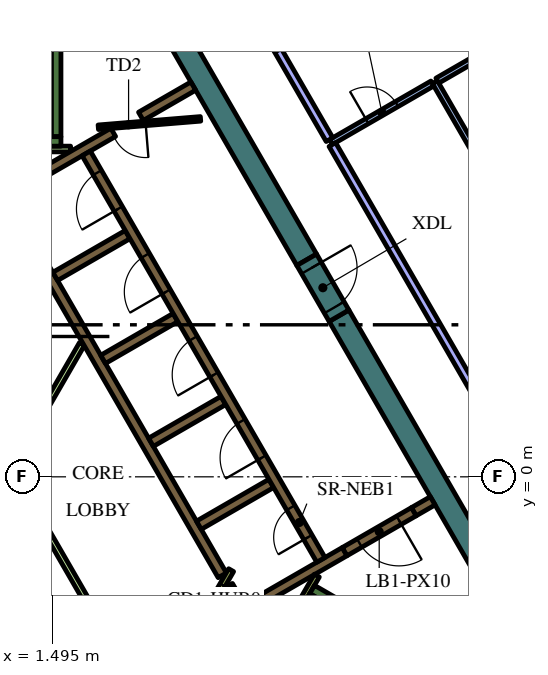
"""IFC4 building model, lengths in metres.
Left out: names, types, materials, properties, quantities, classifications, styles, units other than length and angle.
Written with IfcOpenShell. Run it as: python <this file> out.ifc"""

import sys

from ifc_helpers import new_model, si_unit, direction, frame, frame_2d, origin, place, context, subcontext, project, spatial, rectangle, extrude, element, fill, save


model = new_model("IFC4")
c1 = context("Model", 3, precision=1e-05, world=origin(), true_north=direction((0.0, 1.0)))
c2 = subcontext(c1, "Body", "Model", "MODEL_VIEW")
j1 = project(units=[si_unit("LENGTHUNIT", "METRE"), si_unit("PLANEANGLEUNIT", "RADIAN")], contexts=[c1])
p1 = place(None, origin())
s1 = spatial("IfcSite", under=j1, at=p1, CompositionType="ELEMENT")
p2 = place(p1, origin())
s2 = spatial("IfcBuilding", under=s1, at=p2, CompositionType="ELEMENT")
p3 = place(p2, frame((0.0, 0.0, 279.6)))
s3 = spatial("IfcBuildingStorey", under=s2, at=p3, CompositionType="ELEMENT", Elevation=279.6)
for number, where, z_axis, x_axis in (
    (1, (9.042, 4.239, 0.0), (0.0, 0.0, 1.0), (0.5, -0.866, 0.0)),
    (2, (1.989, 16.456, 0.0), (0.0, 0.0, 1.0), (0.5, -0.866, 0.0)),
):
    element("IfcWall", number, at=place(p3, frame(where, z_axis=z_axis, x_axis=x_axis)), inside=s3, PredefinedType="SOLIDWALL", context=c2, shape_type="SweptSolid", body=[
        extrude(rectangle(XDim=12.406, YDim=0.6, at=frame_2d((6.203, 0.0))), origin(), (0.0, 0.0, 1.0), 4.2),
    ])
p4 = place(p3, frame((8.334, -2.964, 0.0), z_axis=(0.0, 0.0, 1.0), x_axis=(0.866016039709, -0.500016218704, 0.0)))
e3 = element("IfcWall", 3, at=p4, inside=s3, PredefinedType="SOLIDWALL", context=c2, shape_type="SweptSolid", body=[
    extrude(rectangle(XDim=7.05, YDim=0.25, at=frame_2d((3.525, 0.0))), origin(), (0.0, 0.0, 1.0), 4.2),
])
p5 = place(p3, frame((8.168, -3.503, 0.0), z_axis=(0.0, 0.0, 1.0), x_axis=(0.49972245349, 0.866185586049, 0.0)))
e4 = element("IfcWall", 4, at=p5, inside=s3, PredefinedType="SOLIDWALL", context=c2, shape_type="SweptSolid", body=[
    extrude(rectangle(XDim=0.425, YDim=0.25, at=frame_2d((0.212, 0.0))), origin(), (0.0, 0.0, 1.0), 4.2),
])
p6 = place(p3, frame((1.6, 8.95, 0.0), z_axis=(0.0, 0.0, 1.0), x_axis=(0.0, 1.0, 0.0)))
e5 = element("IfcWall", 5, at=p6, inside=s3, PredefinedType="SOLIDWALL", context=c2, shape_type="SweptSolid", body=[
    extrude(rectangle(XDim=6.8, YDim=0.25, at=frame_2d((3.4, 0.0))), origin(), (0.0, 0.0, 1.0), 4.2),
])
p7 = place(p3, frame((1.05, 8.825, 0.0), z_axis=(0.0, 0.0, 1.0), x_axis=(1.0, 0.0, 0.0)))
e6 = element("IfcWall", 6, at=p7, inside=s3, PredefinedType="SOLIDWALL", context=c2, shape_type="SweptSolid", body=[
    extrude(rectangle(XDim=0.675, YDim=0.25, at=frame_2d((0.337, 0.0))), origin(), (0.0, 0.0, 1.0), 4.2),
])
p8 = place(p3, frame((9.19, -1.969, 0.0), z_axis=(0.0, 0.0, 1.0), x_axis=(-0.866057109641, -0.499945079824, 0.0)))
e7 = element("IfcWall", 7, at=p8, inside=s3, PredefinedType="SOLIDWALL", context=c2, shape_type="SweptSolid", body=[
    extrude(rectangle(XDim=3.291, YDim=0.25, at=frame_2d((1.646, 0.0))), origin(), (0.0, 0.0, 1.0), 4.2),
])
p9 = place(p3, frame((6.13, -2.867, 0.0), z_axis=(0.0, 0.0, 1.0), x_axis=(0.500160776593, -0.865932559475, 0.0)))
e8 = element("IfcWall", 8, at=p9, inside=s3, PredefinedType="SOLIDWALL", context=c2, shape_type="SweptSolid", body=[
    extrude(rectangle(XDim=0.627, YDim=0.25, at=frame_2d((0.313, 0.0))), origin(), (0.0, 0.0, 1.0), 4.2),
])
p10 = place(p3, frame((11.507, -0.631, 0.0), z_axis=(0.0, 0.0, 1.0), x_axis=(-0.866093731455, -0.499881634324, 0.0)))
e9 = element("IfcWall", 9, at=p10, inside=s3, PredefinedType="SOLIDWALL", context=c2, shape_type="SweptSolid", body=[
    extrude(rectangle(XDim=0.575, YDim=0.25, at=frame_2d((0.288, 0.0))), origin(), (0.0, 0.0, 1.0), 4.2),
])
p11 = place(p3, frame((3.1, 9.064, 0.0), z_axis=(0.0, 0.0, 1.0), x_axis=(-0.866033137035, -0.499986605379, 0.0)))
e10 = element("IfcWall", 10, at=p11, inside=s3, PredefinedType="SOLIDWALL", context=c2, shape_type="SweptSolid", body=[
    extrude(rectangle(XDim=3.467, YDim=0.25, at=frame_2d((1.733, 0.0))), origin(), (0.0, 0.0, 1.0), 4.2),
])
p12 = place(p3, frame((5.97, -2.591, 0.0), z_axis=(0.0, 0.0, 1.0), x_axis=(-0.499994469932, 0.866028596547, 0.0)))
e11 = element("IfcWall", 11, at=p12, inside=s3, PredefinedType="SOLIDWALL", context=c2, shape_type="SweptSolid", body=[
    extrude(rectangle(XDim=10.488, YDim=0.25, at=frame_2d((5.244, 0.0))), origin(), (0.0, 0.0, 1.0), 4.2),
])
p13 = place(p3, frame((1.574, 5.274, 0.0), z_axis=(0.0, 0.0, 1.0), x_axis=(0.866028486751, 0.499994660107, 0.0)))
e12 = element("IfcWall", 12, at=p13, inside=s3, PredefinedType="SOLIDWALL", context=c2, shape_type="SweptSolid", body=[
    extrude(rectangle(XDim=2.2, YDim=0.25, at=frame_2d((1.1, 0.0))), origin(), (0.0, 0.0, 1.0), 4.2),
])
for number, where, z_axis, x_axis in (
    (13, (2.834, 3.091, 0.0), (0.0, 0.0, 1.0), (0.866, 0.5, 0.0)),
    (14, (4.094, 0.909, 0.0), (0.0, 0.0, 1.0), (0.866, 0.5, 0.0)),
    (15, (5.354, -1.274, 0.0), (0.0, 0.0, 1.0), (0.866, 0.5, 0.0)),
):
    element("IfcWall", number, at=place(p3, frame(where, z_axis=z_axis, x_axis=x_axis)), inside=s3, PredefinedType="SOLIDWALL", context=c2, shape_type="SweptSolid", body=[
        extrude(rectangle(XDim=2.2, YDim=0.25, at=frame_2d((1.1, 0.0))), origin(), (0.0, 0.0, 1.0), 4.2),
    ])
p14 = place(p3, frame((3.83, 9.486, 0.0), z_axis=(0.0, 0.0, 1.0), x_axis=(0.865986202621, 0.500067892261, 0.0)))
e16 = element("IfcWall", 16, at=p14, inside=s3, PredefinedType="SOLIDWALL", context=c2, shape_type="SweptSolid", body=[
    extrude(rectangle(XDim=1.591, YDim=0.25, at=frame_2d((0.795, 0.0))), origin(), (0.0, 0.0, 1.0), 4.2),
])
p15 = place(p3, frame((1.05, 8.625, 0.0), z_axis=(0.0, 0.0, 1.0), x_axis=(1.0, 0.0, 0.0)))
e17 = element("IfcWall", 17, at=p15, inside=s3, PredefinedType="PARTITIONING", context=c2, shape_type="SweptSolid", body=[
    extrude(rectangle(XDim=0.929, YDim=0.15, at=frame_2d((0.464, 0.0))), origin(), (0.0, 0.0, 1.0), 3.55),
])
p16 = place(p3, frame((8.459, -2.599, 0.0), z_axis=(0.0, 0.0, 1.0), x_axis=(-0.500041054325, -0.866001699761, 0.0)))
e18 = element("IfcWall", 18, at=p16, inside=s3, PredefinedType="PARTITIONING", context=c2, shape_type="SweptSolid", body=[
    extrude(rectangle(XDim=0.929, YDim=0.15, at=frame_2d((0.464, 0.0))), origin(), (0.0, 0.0, 1.0), 4.2),
])
p17 = place(p3, frame((-1.887, 4.168, 0.0), z_axis=(0.0, 0.0, 1.0), x_axis=(0.499997069472, -0.866027095719, 0.0)))
e19 = element("IfcWall", 19, at=p17, inside=s3, PredefinedType="PARTITIONING", context=c2, shape_type="SweptSolid", body=[
    extrude(rectangle(XDim=9.106, YDim=0.15, at=frame_2d((4.553, 0.0))), origin(), (0.0, 0.0, 1.0), 3.55),
])
p18 = place(p3, frame((2.277, 3.493, 0.0), z_axis=(0.0, 0.0, 1.0), x_axis=(-0.499994550825, -0.866028549844, 0.0)))
e20 = element("IfcWall", 20, at=p18, inside=s3, PredefinedType="PARTITIONING", context=c2, shape_type="SweptSolid", body=[
    extrude(rectangle(XDim=3.65, YDim=0.15, at=frame_2d((1.825, 0.0))), origin(), (0.0, 0.0, 1.0), 3.55),
])
p19 = place(p3, frame((8.565, -2.185, 0.0), z_axis=(0.0, 0.0, 1.0), x_axis=(-0.499997954832, 0.866026584559, 0.0)))
e21 = element("IfcWall", 21, at=p19, inside=s3, PredefinedType="SOLIDWALL", context=c2, shape_type="SweptSolid", body=[
    extrude(rectangle(XDim=12.35, YDim=0.25, at=frame_2d((6.175, 0.0))), origin(), (0.0, 0.0, 1.0), 4.2),
])
p20 = place(p19, frame((0.685, 0.0, 0.0)))
e22 = element("IfcOpeningElement", 22, at=p20, cuts=e21, PredefinedType="OPENING", context=c2, shape_type="SweptSolid", body=[
    extrude(rectangle(XDim=0.9, YDim=2.1, at=frame_2d((0.45, 1.05))), frame((0.0, 0.135, 0.0), z_axis=(0.0, -1.0, 0.0), x_axis=(1.0, 0.0, 0.0)), (0.0, 0.0, 1.0), 0.27),
])
p21 = place(p19, frame((3.105, 0.0, 0.0)))
e23 = element("IfcOpeningElement", 23, at=p21, cuts=e21, PredefinedType="OPENING", context=c2, shape_type="SweptSolid", body=[
    extrude(rectangle(XDim=1.1, YDim=2.1, at=frame_2d((0.55, 1.05))), frame((0.0, 0.135, 0.0), z_axis=(0.0, -1.0, 0.0), x_axis=(1.0, 0.0, 0.0)), (0.0, 0.0, 1.0), 0.27),
])
p22 = place(p19, frame((5.625, 0.0, 0.0)))
e24 = element("IfcOpeningElement", 24, at=p22, cuts=e21, PredefinedType="OPENING", context=c2, shape_type="SweptSolid", body=[
    extrude(rectangle(XDim=1.1, YDim=2.1, at=frame_2d((0.55, 1.05))), frame((0.0, 0.135, 0.0), z_axis=(0.0, -1.0, 0.0), x_axis=(1.0, 0.0, 0.0)), (0.0, 0.0, 1.0), 0.27),
])
p23 = place(p19, frame((8.145, 0.0, 0.0)))
e25 = element("IfcOpeningElement", 25, at=p23, cuts=e21, PredefinedType="OPENING", context=c2, shape_type="SweptSolid", body=[
    extrude(rectangle(XDim=1.1, YDim=2.1, at=frame_2d((0.55, 1.05))), frame((0.0, 0.135, 0.0), z_axis=(0.0, -1.0, 0.0), x_axis=(1.0, 0.0, 0.0)), (0.0, 0.0, 1.0), 0.27),
])
p24 = place(p19, frame((10.665, 0.0, 0.0)))
e26 = element("IfcOpeningElement", 26, at=p24, cuts=e21, PredefinedType="OPENING", context=c2, shape_type="SweptSolid", body=[
    extrude(rectangle(XDim=1.1, YDim=2.1, at=frame_2d((0.55, 1.05))), frame((0.0, 0.135, 0.0), z_axis=(0.0, -1.0, 0.0), x_axis=(1.0, 0.0, 0.0)), (0.0, 0.0, 1.0), 0.27),
])
p25 = place(p3, frame((5.398, 9.419, 0.0), z_axis=(0.0, 0.0, 1.0), x_axis=(-0.996653416376, -0.081743303248, 0.0)))
e27 = element("IfcWall", 27, at=p25, inside=s3, PredefinedType="PARTITIONING", context=c2, shape_type="SweptSolid", body=[
    extrude(rectangle(XDim=2.7, YDim=0.12, at=frame_2d((1.35, 0.0))), origin(), (0.0, 0.0, 1.0), 3.55),
])
p26 = place(p25, frame((1.45, 0.0, 0.0)))
e28 = element("IfcOpeningElement", 28, at=p26, cuts=e27, PredefinedType="OPENING", context=c2, shape_type="SweptSolid", body=[
    extrude(rectangle(XDim=0.9, YDim=2.1, at=frame_2d((0.45, 1.05))), frame((0.0, 0.07, 0.0), z_axis=(0.0, -1.0, 0.0), x_axis=(1.0, 0.0, 0.0)), (0.0, 0.0, 1.0), 0.14),
])
p27 = place(p3, frame((6.203, -2.456, 0.0), z_axis=(0.0, 0.0, 1.0), x_axis=(-0.500043961785, -0.866000020948, 0.0)))
e29 = element("IfcWall", 29, at=p27, inside=s3, PredefinedType="PARTITIONING", context=c2, shape_type="SweptSolid", body=[
    extrude(rectangle(XDim=1.95, YDim=0.15, at=frame_2d((0.975, 0.0))), origin(), (0.0, 0.0, 1.0), 4.2),
])
p28 = place(p27, frame((0.45, 0.0, 0.0)))
e30 = element("IfcOpeningElement", 30, at=p28, cuts=e29, PredefinedType="OPENING", context=c2, shape_type="SweptSolid", body=[
    extrude(rectangle(XDim=0.9, YDim=2.1, at=frame_2d((0.45, 1.05))), frame((0.0, 0.085, 0.0), z_axis=(0.0, -1.0, 0.0), x_axis=(1.0, 0.0, 0.0)), (0.0, 0.0, 1.0), 0.17),
])
p29 = place(p3, frame((11.009, -0.919, 0.0), z_axis=(0.0, 0.0, 1.0), x_axis=(-0.866059744384, -0.49994051562, 0.0)))
e31 = element("IfcWall", 31, at=p29, inside=s3, PredefinedType="SOLIDWALL", context=c2, shape_type="SweptSolid", body=[
    extrude(rectangle(XDim=2.1, YDim=0.25, at=frame_2d((1.05, 0.0))), origin(), (0.0, 0.0, 1.0), 4.2),
])
p30 = place(p29, frame((0.45, 0.0, 0.0)))
e32 = element("IfcOpeningElement", 32, at=p30, cuts=e31, PredefinedType="OPENING", context=c2, shape_type="SweptSolid", body=[
    extrude(rectangle(XDim=1.2, YDim=2.1, at=frame_2d((0.6, 1.05))), frame((0.0, 0.135, 0.0), z_axis=(0.0, -1.0, 0.0), x_axis=(1.0, 0.0, 0.0)), (0.0, 0.0, 1.0), 0.27),
])
p31 = place(p3, frame((8.192, 5.711, 0.0), z_axis=(0.0, 0.0, 1.0), x_axis=(0.500062241894, -0.865989465428, 0.0)))
e33 = element("IfcWall", 33, at=p31, inside=s3, PredefinedType="SOLIDWALL", context=c2, shape_type="SweptSolid", body=[
    extrude(rectangle(XDim=1.7, YDim=0.6, at=frame_2d((0.85, 0.0))), origin(), (0.0, 0.0, 1.0), 4.2),
])
p32 = place(p31, frame((0.25, 0.0, 0.0)))
e34 = element("IfcOpeningElement", 34, at=p32, cuts=e33, PredefinedType="OPENING", context=c2, shape_type="SweptSolid", body=[
    extrude(rectangle(XDim=1.2, YDim=2.1, at=frame_2d((0.6, 1.05))), frame((0.0, 0.31, 0.0), z_axis=(0.0, -1.0, 0.0), x_axis=(1.0, 0.0, 0.0)), (0.0, 0.0, 1.0), 0.62),
])
p33 = place(p3, frame((11.564, 10.387, 0.0), z_axis=(0.0, 0.0, 1.0), x_axis=(0.500002559113, -0.866023926275, 0.0)))
e35 = element("IfcWall", 35, at=p33, inside=s3, PredefinedType="PARTITIONING", context=c2, shape_type="SweptSolid", body=[
    extrude(rectangle(XDim=6.212, YDim=0.15, at=frame_2d((3.106, 0.0))), origin(), (0.0, 0.0, 1.0), 3.55),
])
p34 = place(p33, frame((2.612, 0.0, 0.0)))
e36 = element("IfcOpeningElement", 36, at=p34, cuts=e35, PredefinedType="OPENING", context=c2, shape_type="SweptSolid", body=[
    extrude(rectangle(XDim=0.9, YDim=2.1, at=frame_2d((0.45, 1.05))), frame((0.0, 0.085, 0.0), z_axis=(0.0, -1.0, 0.0), x_axis=(1.0, 0.0, 0.0)), (0.0, 0.0, 1.0), 0.17),
])
p35 = place(p3, frame((11.629, 10.424, 0.0), z_axis=(0.0, 0.0, 1.0), x_axis=(0.866061796884, 0.499936960004, 0.0)))
e37 = element("IfcWall", 37, at=p35, inside=s3, PredefinedType="PARTITIONING", context=c2, shape_type="SweptSolid", body=[
    extrude(rectangle(XDim=3.021, YDim=0.15, at=frame_2d((1.511, 0.0))), origin(), (0.0, 0.0, 1.0), 3.55),
])
p36 = place(p3, frame((8.829, 8.808, 0.0), z_axis=(0.0, 0.0, 1.0), x_axis=(0.866041857893, 0.499971499565, 0.0)))
e38 = element("IfcWall", 38, at=p36, inside=s3, PredefinedType="PARTITIONING", context=c2, shape_type="SweptSolid", body=[
    extrude(rectangle(XDim=3.083, YDim=0.15, at=frame_2d((1.542, 0.0))), origin(), (0.0, 0.0, 1.0), 3.55),
])
p37 = place(p36, frame((1.1, 0.0, 0.0)))
e39 = element("IfcOpeningElement", 39, at=p37, cuts=e38, PredefinedType="OPENING", context=c2, shape_type="SweptSolid", body=[
    extrude(rectangle(XDim=0.9, YDim=2.1, at=frame_2d((0.45, 1.05))), frame((0.0, 0.085, 0.0), z_axis=(0.0, -1.0, 0.0), x_axis=(1.0, 0.0, 0.0)), (0.0, 0.0, 1.0), 0.17),
])
p38 = place(p3, frame((13.436, 0.829, 0.0), z_axis=(0.0, 0.0, 1.0), x_axis=(-0.499983789798, 0.866034762547, 0.0)))
e40 = element("IfcWall", 40, at=p38, inside=s3, PredefinedType="PARTITIONING", context=c2, shape_type="SweptSolid", body=[
    extrude(rectangle(XDim=9.138, YDim=0.2, at=frame_2d((4.569, 0.0))), origin(), (0.0, 0.0, 1.0), 3.55),
])
p39 = place(p3, frame((8.792, 8.873, 0.0), z_axis=(0.0, 0.0, 1.0), x_axis=(-0.499992600721, 0.866029675718, 0.0)))
e41 = element("IfcWall", 41, at=p39, inside=s3, PredefinedType="PARTITIONING", context=c2, shape_type="SweptSolid", body=[
    extrude(rectangle(XDim=2.712, YDim=0.2, at=frame_2d((1.356, 0.0))), origin(), (0.0, 0.0, 1.0), 3.55),
])
p40 = place(p20, origin())
e42 = element("IfcDoor", 42, at=p40, inside=s3, OperationType="SINGLE_SWING_LEFT", PredefinedType="DOOR", context=c2, shape_type="SweptSolid", body=[
    extrude(rectangle(XDim=0.9, YDim=2.1, at=frame_2d((0.45, 1.05))), frame((0.0, 0.025, 0.0), z_axis=(0.0, -1.0, 0.0), x_axis=(1.0, 0.0, 0.0)), (0.0, 0.0, 1.0), 0.05),
])
fill(e22, e42)
p41 = place(p21, origin())
e43 = element("IfcDoor", 43, at=p41, inside=s3, OperationType="DOUBLE_DOOR_SLIDING", PredefinedType="DOOR", context=c2, shape_type="SweptSolid", body=[
    extrude(rectangle(XDim=1.1, YDim=2.1, at=frame_2d((0.55, 1.05))), frame((0.0, 0.025, 0.0), z_axis=(0.0, -1.0, 0.0), x_axis=(1.0, 0.0, 0.0)), (0.0, 0.0, 1.0), 0.05),
])
fill(e23, e43)
p42 = place(p22, origin())
e44 = element("IfcDoor", 44, at=p42, inside=s3, OperationType="DOUBLE_DOOR_SLIDING", PredefinedType="DOOR", context=c2, shape_type="SweptSolid", body=[
    extrude(rectangle(XDim=1.1, YDim=2.1, at=frame_2d((0.55, 1.05))), frame((0.0, 0.025, 0.0), z_axis=(0.0, -1.0, 0.0), x_axis=(1.0, 0.0, 0.0)), (0.0, 0.0, 1.0), 0.05),
])
fill(e24, e44)
p43 = place(p23, origin())
e45 = element("IfcDoor", 45, at=p43, inside=s3, OperationType="DOUBLE_DOOR_SLIDING", PredefinedType="DOOR", context=c2, shape_type="SweptSolid", body=[
    extrude(rectangle(XDim=1.1, YDim=2.1, at=frame_2d((0.55, 1.05))), frame((0.0, 0.025, 0.0), z_axis=(0.0, -1.0, 0.0), x_axis=(1.0, 0.0, 0.0)), (0.0, 0.0, 1.0), 0.05),
])
fill(e25, e45)
p44 = place(p24, origin())
e46 = element("IfcDoor", 46, at=p44, inside=s3, OperationType="DOUBLE_DOOR_SLIDING", PredefinedType="DOOR", context=c2, shape_type="SweptSolid", body=[
    extrude(rectangle(XDim=1.1, YDim=2.1, at=frame_2d((0.55, 1.05))), frame((0.0, 0.025, 0.0), z_axis=(0.0, -1.0, 0.0), x_axis=(1.0, 0.0, 0.0)), (0.0, 0.0, 1.0), 0.05),
])
fill(e26, e46)
p45 = place(p26, origin())
e47 = element("IfcDoor", 47, at=p45, inside=s3, OperationType="SINGLE_SWING_LEFT", PredefinedType="DOOR", context=c2, shape_type="SweptSolid", body=[
    extrude(rectangle(XDim=0.9, YDim=2.1, at=frame_2d((0.45, 1.05))), frame((0.0, 0.025, 0.0), z_axis=(0.0, -1.0, 0.0), x_axis=(1.0, 0.0, 0.0)), (0.0, 0.0, 1.0), 0.05),
])
fill(e28, e47)
p46 = place(p28, origin())
e48 = element("IfcDoor", 48, at=p46, inside=s3, OperationType="SINGLE_SWING_LEFT", PredefinedType="DOOR", context=c2, shape_type="SweptSolid", body=[
    extrude(rectangle(XDim=0.9, YDim=2.1, at=frame_2d((0.45, 1.05))), frame((0.0, 0.025, 0.0), z_axis=(0.0, -1.0, 0.0), x_axis=(1.0, 0.0, 0.0)), (0.0, 0.0, 1.0), 0.05),
])
fill(e30, e48)
p47 = place(p30, origin())
e49 = element("IfcDoor", 49, at=p47, inside=s3, OperationType="SINGLE_SWING_LEFT", PredefinedType="DOOR", context=c2, shape_type="SweptSolid", body=[
    extrude(rectangle(XDim=1.2, YDim=2.1, at=frame_2d((0.6, 1.05))), frame((0.0, 0.025, 0.0), z_axis=(0.0, -1.0, 0.0), x_axis=(1.0, 0.0, 0.0)), (0.0, 0.0, 1.0), 0.05),
])
fill(e32, e49)
p48 = place(p32, origin())
e50 = element("IfcDoor", 50, at=p48, inside=s3, OperationType="SINGLE_SWING_LEFT", PredefinedType="DOOR", context=c2, shape_type="SweptSolid", body=[
    extrude(rectangle(XDim=1.2, YDim=2.1, at=frame_2d((0.6, 1.05))), frame((0.0, 0.025, 0.0), z_axis=(0.0, -1.0, 0.0), x_axis=(1.0, 0.0, 0.0)), (0.0, 0.0, 1.0), 0.05),
])
fill(e34, e50)
p49 = place(p37, origin())
e51 = element("IfcDoor", 51, at=p49, inside=s3, OperationType="SINGLE_SWING_RIGHT", PredefinedType="DOOR", context=c2, shape_type="SweptSolid", body=[
    extrude(rectangle(XDim=0.9, YDim=2.1, at=frame_2d((0.45, 1.05))), frame((0.0, 0.025, 0.0), z_axis=(0.0, -1.0, 0.0), x_axis=(1.0, 0.0, 0.0)), (0.0, 0.0, 1.0), 0.05),
])
fill(e39, e51)
save(model, sys.argv[1])
